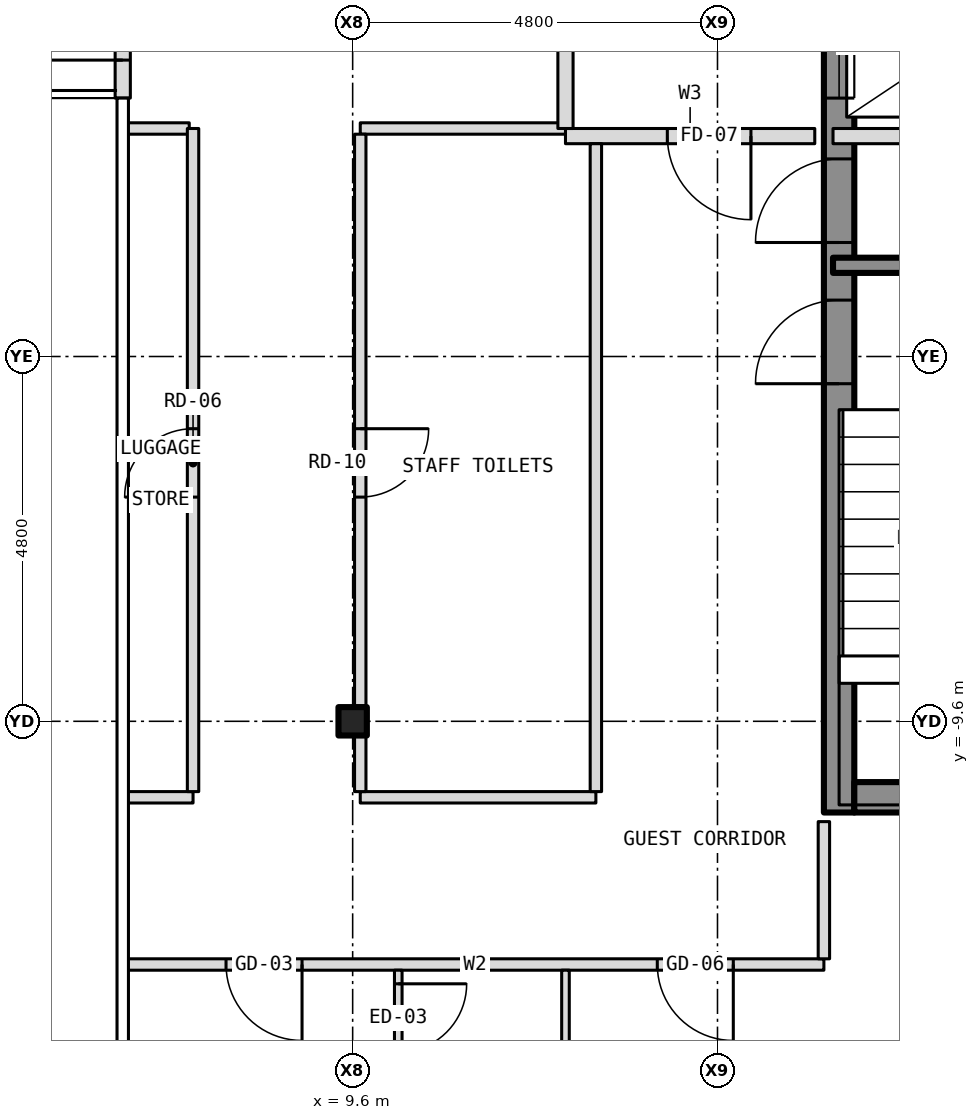
"""IFC4 building model, lengths in metres.
Left out: names, types, materials, properties, quantities, classifications, styles, units other than length and angle.
Written with IfcOpenShell. Run it as: python <this file> out.ifc"""

import sys

from ifc_helpers import new_model, si_unit, direction, frame, frame_2d, origin, origin_2d, place, context, subcontext, project, spatial, rectangle, i_section, extrude, element, fill, save


model = new_model("IFC4")
c1 = context("Model", 3, precision=1e-05, world=origin(), true_north=direction((0.0, 1.0)))
c2 = subcontext(c1, "Body", "Model", "MODEL_VIEW")
j1 = project(units=[si_unit("LENGTHUNIT", "METRE"), si_unit("PLANEANGLEUNIT", "RADIAN")], contexts=[c1])
p1 = place(None, origin())
s1 = spatial("IfcSite", under=j1, at=p1, CompositionType="ELEMENT")
p2 = place(p1, origin())
s2 = spatial("IfcBuilding", under=s1, at=p2, CompositionType="ELEMENT")
p3 = place(p2, frame((0.0, 0.0, 233.0)))
s3 = spatial("IfcBuildingStorey", under=s2, at=p3, CompositionType="ELEMENT", Elevation=233.0)
p4 = place(p3, frame((9.6, -9.6, -0.15), z_axis=(0.0, 0.0, 1.0), x_axis=(1.0, 0.0, 0.0)))
e1 = element("IfcColumn", 1, at=p4, inside=s3, PredefinedType="COLUMN", context=c2, shape_type="SweptSolid", body=[
    extrude(i_section(OverallWidth=0.373, OverallDepth=0.373, WebThickness=0.016, FlangeThickness=0.026, at=origin_2d()), origin(), (0.0, 0.0, 1.0), 3.35),
])
p5 = place(p3, frame((16.0, -10.8, 0.0), z_axis=(0.0, 0.0, 1.0), x_axis=(0.0, 1.0, 0.0)))
e2 = element("IfcWall", 2, at=p5, inside=s3, PredefinedType="SHEAR", context=c2, shape_type="SweptSolid", body=[
    extrude(rectangle(XDim=21.6, YDim=0.4, at=frame_2d((10.8, 0.0))), origin(), (0.0, 0.0, 1.0), 2.9),
])
p6 = place(p5, frame((9.4, 0.0, 0.0)))
e3 = element("IfcOpeningElement", 3, at=p6, cuts=e2, PredefinedType="OPENING", context=c2, shape_type="SweptSolid", body=[
    extrude(rectangle(XDim=1.1, YDim=2.1, at=frame_2d((0.55, 1.05))), frame((0.0, 0.212, 0.0), z_axis=(0.0, -1.0, 0.0), x_axis=(1.0, 0.0, 0.0)), (0.0, 0.0, 1.0), 0.424),
])
p7 = place(p5, frame((11.5, 0.0, 0.0)))
e4 = element("IfcOpeningElement", 4, at=p7, cuts=e2, PredefinedType="OPENING", context=c2, shape_type="SweptSolid", body=[
    extrude(rectangle(XDim=1.1, YDim=2.1, at=frame_2d((0.55, 1.05))), frame((0.0, 0.212, 0.0), z_axis=(0.0, -1.0, 0.0), x_axis=(1.0, 0.0, 0.0)), (0.0, 0.0, 1.0), 0.424),
])
p8 = place(p5, frame((13.6, 0.0, 0.0)))
e5 = element("IfcOpeningElement", 5, at=p8, cuts=e2, PredefinedType="OPENING", context=c2, shape_type="SweptSolid", body=[
    extrude(rectangle(XDim=1.1, YDim=2.1, at=frame_2d((0.55, 1.05))), frame((0.0, 0.212, 0.0), z_axis=(0.0, -1.0, 0.0), x_axis=(1.0, 0.0, 0.0)), (0.0, 0.0, 1.0), 0.424),
])
p9 = place(p5, frame((15.7, 0.0, 0.0)))
e6 = element("IfcOpeningElement", 6, at=p9, cuts=e2, PredefinedType="OPENING", context=c2, shape_type="SweptSolid", body=[
    extrude(rectangle(XDim=1.1, YDim=2.1, at=frame_2d((0.55, 1.05))), frame((0.0, 0.212, 0.0), z_axis=(0.0, -1.0, 0.0), x_axis=(1.0, 0.0, 0.0)), (0.0, 0.0, 1.0), 0.424),
])
p10 = place(p5, frame((17.8, 0.0, 0.0)))
e7 = element("IfcOpeningElement", 7, at=p10, cuts=e2, PredefinedType="OPENING", context=c2, shape_type="SweptSolid", body=[
    extrude(rectangle(XDim=1.1, YDim=2.1, at=frame_2d((0.55, 1.05))), frame((0.0, 0.212, 0.0), z_axis=(0.0, -1.0, 0.0), x_axis=(1.0, 0.0, 0.0)), (0.0, 0.0, 1.0), 0.424),
])
p11 = place(p5, frame((5.642, 0.0, 0.0)))
e8 = element("IfcOpeningElement", 8, at=p11, cuts=e2, PredefinedType="OPENING", context=c2, shape_type="SweptSolid", body=[
    extrude(rectangle(XDim=1.1, YDim=2.1, at=frame_2d((0.55, 1.05))), frame((0.0, 0.212, 0.0), z_axis=(0.0, -1.0, 0.0), x_axis=(1.0, 0.0, 0.0)), (0.0, 0.0, 1.0), 0.424),
])
p12 = place(p5, frame((7.5, 0.0, 0.0)))
e9 = element("IfcOpeningElement", 9, at=p12, cuts=e2, PredefinedType="OPENING", context=c2, shape_type="SweptSolid", body=[
    extrude(rectangle(XDim=1.1, YDim=2.1, at=frame_2d((0.55, 1.05))), frame((0.0, 0.212, 0.0), z_axis=(0.0, -1.0, 0.0), x_axis=(1.0, 0.0, 0.0)), (0.0, 0.0, 1.0), 0.424),
])
p13 = place(p5, frame((20.0, 0.0, 0.0)))
e10 = element("IfcOpeningElement", 10, at=p13, cuts=e2, PredefinedType="OPENING", context=c2, shape_type="SweptSolid", body=[
    extrude(rectangle(XDim=0.9, YDim=2.1, at=frame_2d((0.45, 1.05))), frame((0.0, 0.212, 0.0), z_axis=(0.0, -1.0, 0.0), x_axis=(1.0, 0.0, 0.0)), (0.0, 0.0, 1.0), 0.424),
])
p14 = place(p3, frame((16.2, -10.6, 0.0), z_axis=(0.0, 0.0, 1.0), x_axis=(1.0, 0.0, 0.0)))
e11 = element("IfcWall", 11, at=p14, inside=s3, PredefinedType="SHEAR", context=c2, shape_type="SweptSolid", body=[
    extrude(rectangle(XDim=3.8, YDim=0.4, at=frame_2d((1.9, 0.0))), origin(), (0.0, 0.0, 1.0), 2.9),
])
p15 = place(p3, frame((6.575, -1.4, 0.0), z_axis=(0.0, 0.0, 1.0), x_axis=(0.0, 1.0, 0.0)))
e12 = element("IfcWall", 12, at=p15, inside=s3, PredefinedType="SOLIDWALL", context=c2, shape_type="SweptSolid", body=[
    extrude(rectangle(XDim=2.8, YDim=0.2, at=frame_2d((1.4, 0.0))), origin(), (0.0, 0.0, 1.0), 3.5),
])
p16 = place(p15, frame((0.5, 0.0, 0.0)))
e13 = element("IfcOpeningElement", 13, at=p16, cuts=e12, PredefinedType="OPENING", context=c2, shape_type="SweptSolid", body=[
    extrude(rectangle(XDim=1.8, YDim=2.1, at=frame_2d((0.9, 1.05))), frame((0.0, 0.112, 0.0), z_axis=(0.0, -1.0, 0.0), x_axis=(1.0, 0.0, 0.0)), (0.0, 0.0, 1.0), 0.224),
])
p17 = place(p3, frame((6.62, -12.8, 0.0), z_axis=(0.0, 0.0, 1.0), x_axis=(1.0, 0.0, 0.0)))
e14 = element("IfcWall", 14, at=p17, inside=s3, PredefinedType="PARTITIONING", context=c2, shape_type="SweptSolid", body=[
    extrude(rectangle(XDim=9.18, YDim=0.15, at=frame_2d((4.59, 0.0))), origin(), (0.0, 0.0, 1.0), 3.2),
])
p18 = place(p17, frame((1.314, 0.0, 0.0)))
e15 = element("IfcOpeningElement", 15, at=p18, cuts=e14, PredefinedType="OPENING", context=c2, shape_type="SweptSolid", body=[
    extrude(rectangle(XDim=1.0, YDim=2.1, at=frame_2d((0.5, 1.05))), frame((0.0, 0.087, 0.0), z_axis=(0.0, -1.0, 0.0), x_axis=(1.0, 0.0, 0.0)), (0.0, 0.0, 1.0), 0.174),
])
p19 = place(p17, frame((6.988, 0.0, 0.0)))
e16 = element("IfcOpeningElement", 16, at=p19, cuts=e14, PredefinedType="OPENING", context=c2, shape_type="SweptSolid", body=[
    extrude(rectangle(XDim=1.0, YDim=2.1, at=frame_2d((0.5, 1.05))), frame((0.0, 0.087, 0.0), z_axis=(0.0, -1.0, 0.0), x_axis=(1.0, 0.0, 0.0)), (0.0, 0.0, 1.0), 0.174),
])
p20 = place(p3, frame((6.62, -10.6, 0.0), z_axis=(0.0, 0.0, 1.0), x_axis=(1.0, 0.0, 0.0)))
e17 = element("IfcWall", 17, at=p20, inside=s3, PredefinedType="PARTITIONING", context=c2, shape_type="SweptSolid", body=[
    extrude(rectangle(XDim=0.88, YDim=0.15, at=frame_2d((0.44, 0.0))), origin(), (0.0, 0.0, 1.0), 3.2),
])
p21 = place(p3, frame((9.7, -10.6, 0.0), z_axis=(0.0, 0.0, 1.0), x_axis=(1.0, 0.0, 0.0)))
e18 = element("IfcWall", 18, at=p21, inside=s3, PredefinedType="PARTITIONING", context=c2, shape_type="SweptSolid", body=[
    extrude(rectangle(XDim=3.1, YDim=0.15, at=frame_2d((1.55, 0.0))), origin(), (0.0, 0.0, 1.0), 3.2),
])
p22 = place(p3, frame((15.92, -3.6, 0.0), z_axis=(0.0, 0.0, 1.0), x_axis=(1.0, 0.0, 0.0)))
e19 = element("IfcWall", 19, at=p22, inside=s3, PredefinedType="SHEAR", context=c2, shape_type="SweptSolid", body=[
    extrude(rectangle(XDim=4.08, YDim=0.2, at=frame_2d((2.04, 0.0))), origin(), (0.0, 0.0, 1.0), 2.9),
])
p23 = place(p3, frame((12.4, -1.9, 0.0), z_axis=(0.0, 0.0, 1.0), x_axis=(1.0, 0.0, 0.0)))
e20 = element("IfcWall", 20, at=p23, inside=s3, PredefinedType="PARTITIONING", context=c2, shape_type="SweptSolid", body=[
    extrude(rectangle(XDim=3.28, YDim=0.2, at=frame_2d((1.64, 0.0))), origin(), (0.0, 0.0, 1.0), 3.2),
])
p24 = place(p23, frame((1.34, 0.0, 0.0)))
e21 = element("IfcOpeningElement", 21, at=p24, cuts=e20, PredefinedType="OPENING", context=c2, shape_type="SweptSolid", body=[
    extrude(rectangle(XDim=1.1, YDim=2.1, at=frame_2d((0.55, 1.05))), frame((0.0, 0.112, 0.0), z_axis=(0.0, -1.0, 0.0), x_axis=(1.0, 0.0, 0.0)), (0.0, 0.0, 1.0), 0.224),
])
p25 = place(p3, frame((15.92, -1.9, 0.0), z_axis=(0.0, 0.0, 1.0), x_axis=(1.0, 0.0, 0.0)))
e22 = element("IfcWall", 22, at=p25, inside=s3, PredefinedType="PARTITIONING", context=c2, shape_type="SweptSolid", body=[
    extrude(rectangle(XDim=4.36, YDim=0.2, at=frame_2d((2.18, 0.0))), origin(), (0.0, 0.0, 1.0), 2.9),
])
p26 = place(p3, frame((6.62, -1.8, 0.0), z_axis=(0.0, 0.0, 1.0), x_axis=(1.0, 0.0, 0.0)))
e23 = element("IfcWall", 23, at=p26, inside=s3, PredefinedType="PARTITIONING", context=c2, shape_type="SweptSolid", body=[
    extrude(rectangle(XDim=0.83, YDim=0.15, at=frame_2d((0.415, 0.0))), origin(), (0.0, 0.0, 1.0), 3.2),
])
p27 = place(p3, frame((9.7, -1.8, 0.0), z_axis=(0.0, 0.0, 1.0), x_axis=(1.0, 0.0, 0.0)))
e24 = element("IfcWall", 24, at=p27, inside=s3, PredefinedType="PARTITIONING", context=c2, shape_type="SweptSolid", body=[
    extrude(rectangle(XDim=2.7, YDim=0.15, at=frame_2d((1.35, 0.0))), origin(), (0.0, 0.0, 1.0), 3.2),
])
p28 = place(p3, frame((7.5, -10.525, 0.0), z_axis=(0.0, 0.0, 1.0), x_axis=(0.0, 1.0, 0.0)))
e25 = element("IfcWall", 25, at=p28, inside=s3, PredefinedType="PARTITIONING", context=c2, shape_type="SweptSolid", body=[
    extrude(rectangle(XDim=8.725, YDim=0.15, at=frame_2d((4.362, 0.0))), origin(), (0.0, 0.0, 1.0), 3.2),
])
p29 = place(p28, frame((3.875, 0.0, 0.0)))
e26 = element("IfcOpeningElement", 26, at=p29, cuts=e25, PredefinedType="OPENING", context=c2, shape_type="SweptSolid", body=[
    extrude(rectangle(XDim=0.9, YDim=2.1, at=frame_2d((0.45, 1.05))), frame((0.0, 0.087, 0.0), z_axis=(0.0, -1.0, 0.0), x_axis=(1.0, 0.0, 0.0)), (0.0, 0.0, 1.0), 0.174),
])
p30 = place(p3, frame((9.7, -10.525, 0.0), z_axis=(0.0, 0.0, 1.0), x_axis=(0.0, 1.0, 0.0)))
e27 = element("IfcWall", 27, at=p30, inside=s3, PredefinedType="PARTITIONING", context=c2, shape_type="SweptSolid", body=[
    extrude(rectangle(XDim=0.725, YDim=0.15, at=frame_2d((0.362, 0.0))), origin(), (0.0, 0.0, 1.0), 2.578),
])
p31 = place(p3, frame((9.7, -9.8, 0.0), z_axis=(0.0, 0.0, 1.0), x_axis=(0.0, 1.0, 0.0)))
e28 = element("IfcWall", 28, at=p31, inside=s3, PredefinedType="PARTITIONING", context=c2, shape_type="SweptSolid", body=[
    extrude(rectangle(XDim=0.401, YDim=0.15, at=frame_2d((0.201, 0.0))), origin(), (0.0, 0.0, 1.0), 3.2),
])
p32 = place(p3, frame((9.7, -9.399, 0.0), z_axis=(0.0, 0.0, 1.0), x_axis=(0.0, 1.0, 0.0)))
e29 = element("IfcWall", 29, at=p32, inside=s3, PredefinedType="PARTITIONING", context=c2, shape_type="SweptSolid", body=[
    extrude(rectangle(XDim=7.524, YDim=0.15, at=frame_2d((3.762, 0.0))), origin(), (0.0, 0.0, 1.0), 2.578),
])
p33 = place(p32, frame((2.749, 0.0, 0.0)))
e30 = element("IfcOpeningElement", 30, at=p33, cuts=e29, PredefinedType="OPENING", context=c2, shape_type="SweptSolid", body=[
    extrude(rectangle(XDim=0.9, YDim=2.1, at=frame_2d((0.45, 1.05))), frame((0.0, 0.087, 0.0), z_axis=(0.0, -1.0, 0.0), x_axis=(1.0, 0.0, 0.0)), (0.0, 0.0, 1.0), 0.174),
])
p34 = place(p3, frame((10.2, -15.95, 0.0), z_axis=(0.0, 0.0, 1.0), x_axis=(0.0, 1.0, 0.0)))
e31 = element("IfcWall", 31, at=p34, inside=s3, PredefinedType="PARTITIONING", context=c2, shape_type="SweptSolid", body=[
    extrude(rectangle(XDim=3.075, YDim=0.1, at=frame_2d((1.538, 0.0))), origin(), (0.0, 0.0, 1.0), 3.2),
])
p35 = place(p34, frame((1.996, 0.0, 0.0)))
e32 = element("IfcOpeningElement", 32, at=p35, cuts=e31, PredefinedType="OPENING", context=c2, shape_type="SweptSolid", body=[
    extrude(rectangle(XDim=0.9, YDim=2.1, at=frame_2d((0.45, 1.05))), frame((0.0, 0.062, 0.0), z_axis=(0.0, -1.0, 0.0), x_axis=(1.0, 0.0, 0.0)), (0.0, 0.0, 1.0), 0.124),
])
p36 = place(p3, frame((12.4, -20.78, 0.0), z_axis=(0.0, 0.0, 1.0), x_axis=(0.0, 1.0, 0.0)))
e33 = element("IfcWall", 33, at=p36, inside=s3, PredefinedType="PARTITIONING", context=c2, shape_type="SweptSolid", body=[
    extrude(rectangle(XDim=7.905, YDim=0.1, at=frame_2d((3.953, 0.0))), origin(), (0.0, 0.0, 1.0), 3.2),
])
p37 = place(p3, frame((12.4, -1.8, 0.0), z_axis=(0.0, 0.0, 1.0), x_axis=(0.0, 1.0, 0.0)))
e34 = element("IfcWall", 34, at=p37, inside=s3, PredefinedType="PARTITIONING", context=c2, shape_type="SweptSolid", body=[
    extrude(rectangle(XDim=4.0, YDim=0.2, at=frame_2d((2.0, 0.0))), origin(), (0.0, 0.0, 1.0), 3.2),
])
p38 = place(p37, frame((1.25, 0.0, 0.0)))
e35 = element("IfcOpeningElement", 35, at=p38, cuts=e34, PredefinedType="OPENING", context=c2, shape_type="SweptSolid", body=[
    extrude(rectangle(XDim=1.1, YDim=2.1, at=frame_2d((0.55, 1.05))), frame((0.0, 0.112, 0.0), z_axis=(0.0, -1.0, 0.0), x_axis=(1.0, 0.0, 0.0)), (0.0, 0.0, 1.0), 0.224),
])
p39 = place(p3, frame((12.8, -10.525, 0.0), z_axis=(0.0, 0.0, 1.0), x_axis=(0.0, 1.0, 0.0)))
e36 = element("IfcWall", 36, at=p39, inside=s3, PredefinedType="PARTITIONING", context=c2, shape_type="SweptSolid", body=[
    extrude(rectangle(XDim=8.525, YDim=0.15, at=frame_2d((4.262, 0.0))), origin(), (0.0, 0.0, 1.0), 3.2),
])
p40 = place(p3, frame((15.8, -12.725, 0.0), z_axis=(0.0, 0.0, 1.0), x_axis=(0.0, 1.0, 0.0)))
e37 = element("IfcWall", 37, at=p40, inside=s3, PredefinedType="PARTITIONING", context=c2, shape_type="SweptSolid", body=[
    extrude(rectangle(XDim=1.805, YDim=0.15, at=frame_2d((0.903, 0.0))), origin(), (0.0, 0.0, 1.0), 3.2),
])
p41 = place(p16, origin())
e38 = element("IfcDoor", 38, at=p41, inside=s3, OperationType="DOUBLE_DOOR_DOUBLE_SWING", PredefinedType="DOOR", context=c2, shape_type="SweptSolid", body=[
    extrude(rectangle(XDim=1.8, YDim=2.1, at=frame_2d((0.9, 1.05))), frame((0.0, 0.025, 0.0), z_axis=(0.0, -1.0, 0.0), x_axis=(1.0, 0.0, 0.0)), (0.0, 0.0, 1.0), 0.05),
])
fill(e13, e38)
p42 = place(p6, origin())
e39 = element("IfcDoor", 39, at=p42, inside=s3, OperationType="SLIDING_TO_LEFT", PredefinedType="DOOR", context=c2, shape_type="SweptSolid", body=[
    extrude(rectangle(XDim=1.1, YDim=2.1, at=frame_2d((0.55, 1.05))), frame((0.0, 0.025, 0.0), z_axis=(0.0, -1.0, 0.0), x_axis=(1.0, 0.0, 0.0)), (0.0, 0.0, 1.0), 0.05),
])
fill(e3, e39)
p43 = place(p11, origin())
e40 = element("IfcDoor", 40, at=p43, inside=s3, OperationType="SINGLE_SWING_LEFT", PredefinedType="DOOR", context=c2, shape_type="SweptSolid", body=[
    extrude(rectangle(XDim=1.1, YDim=2.1, at=frame_2d((0.55, 1.05))), frame((0.0, 0.025, 0.0), z_axis=(0.0, -1.0, 0.0), x_axis=(1.0, 0.0, 0.0)), (0.0, 0.0, 1.0), 0.05),
])
fill(e8, e40)
p44 = place(p12, origin())
e41 = element("IfcDoor", 41, at=p44, inside=s3, OperationType="SINGLE_SWING_LEFT", PredefinedType="DOOR", context=c2, shape_type="SweptSolid", body=[
    extrude(rectangle(XDim=1.1, YDim=2.1, at=frame_2d((0.55, 1.05))), frame((0.0, 0.025, 0.0), z_axis=(0.0, -1.0, 0.0), x_axis=(1.0, 0.0, 0.0)), (0.0, 0.0, 1.0), 0.05),
])
fill(e9, e41)
p45 = place(p24, origin())
e42 = element("IfcDoor", 42, at=p45, inside=s3, OperationType="SINGLE_SWING_RIGHT", PredefinedType="DOOR", context=c2, shape_type="SweptSolid", body=[
    extrude(rectangle(XDim=1.1, YDim=2.1, at=frame_2d((0.55, 1.05))), frame((0.0, 0.025, 0.0), z_axis=(0.0, -1.0, 0.0), x_axis=(1.0, 0.0, 0.0)), (0.0, 0.0, 1.0), 0.05),
])
fill(e21, e42)
p46 = place(p18, origin())
e43 = element("IfcDoor", 43, at=p46, inside=s3, OperationType="SINGLE_SWING_RIGHT", PredefinedType="DOOR", context=c2, shape_type="SweptSolid", body=[
    extrude(rectangle(XDim=1.0, YDim=2.1, at=frame_2d((0.5, 1.05))), frame((0.0, 0.025, 0.0), z_axis=(0.0, -1.0, 0.0), x_axis=(1.0, 0.0, 0.0)), (0.0, 0.0, 1.0), 0.05),
])
fill(e15, e43)
p47 = place(p35, origin())
e44 = element("IfcDoor", 44, at=p47, inside=s3, OperationType="SINGLE_SWING_RIGHT", PredefinedType="DOOR", context=c2, shape_type="SweptSolid", body=[
    extrude(rectangle(XDim=0.9, YDim=2.1, at=frame_2d((0.45, 1.05))), frame((0.0, 0.025, 0.0), z_axis=(0.0, -1.0, 0.0), x_axis=(1.0, 0.0, 0.0)), (0.0, 0.0, 1.0), 0.05),
])
fill(e32, e44)
p48 = place(p19, origin())
e45 = element("IfcDoor", 45, at=p48, inside=s3, OperationType="SINGLE_SWING_RIGHT", PredefinedType="DOOR", context=c2, shape_type="SweptSolid", body=[
    extrude(rectangle(XDim=1.0, YDim=2.1, at=frame_2d((0.5, 1.05))), frame((0.0, 0.025, 0.0), z_axis=(0.0, -1.0, 0.0), x_axis=(1.0, 0.0, 0.0)), (0.0, 0.0, 1.0), 0.05),
])
fill(e16, e45)
p49 = place(p29, origin())
e46 = element("IfcDoor", 46, at=p49, inside=s3, OperationType="SINGLE_SWING_LEFT", PredefinedType="DOOR", context=c2, shape_type="SweptSolid", body=[
    extrude(rectangle(XDim=0.9, YDim=2.1, at=frame_2d((0.45, 1.05))), frame((0.0, 0.025, 0.0), z_axis=(0.0, -1.0, 0.0), x_axis=(1.0, 0.0, 0.0)), (0.0, 0.0, 1.0), 0.05),
])
fill(e26, e46)
p50 = place(p33, origin())
e47 = element("IfcDoor", 47, at=p50, inside=s3, OperationType="SINGLE_SWING_RIGHT", PredefinedType="DOOR", context=c2, shape_type="SweptSolid", body=[
    extrude(rectangle(XDim=0.9, YDim=2.1, at=frame_2d((0.45, 1.05))), frame((0.0, 0.025, 0.0), z_axis=(0.0, -1.0, 0.0), x_axis=(1.0, 0.0, 0.0)), (0.0, 0.0, 1.0), 0.05),
])
fill(e30, e47)
save(model, sys.argv[1])
